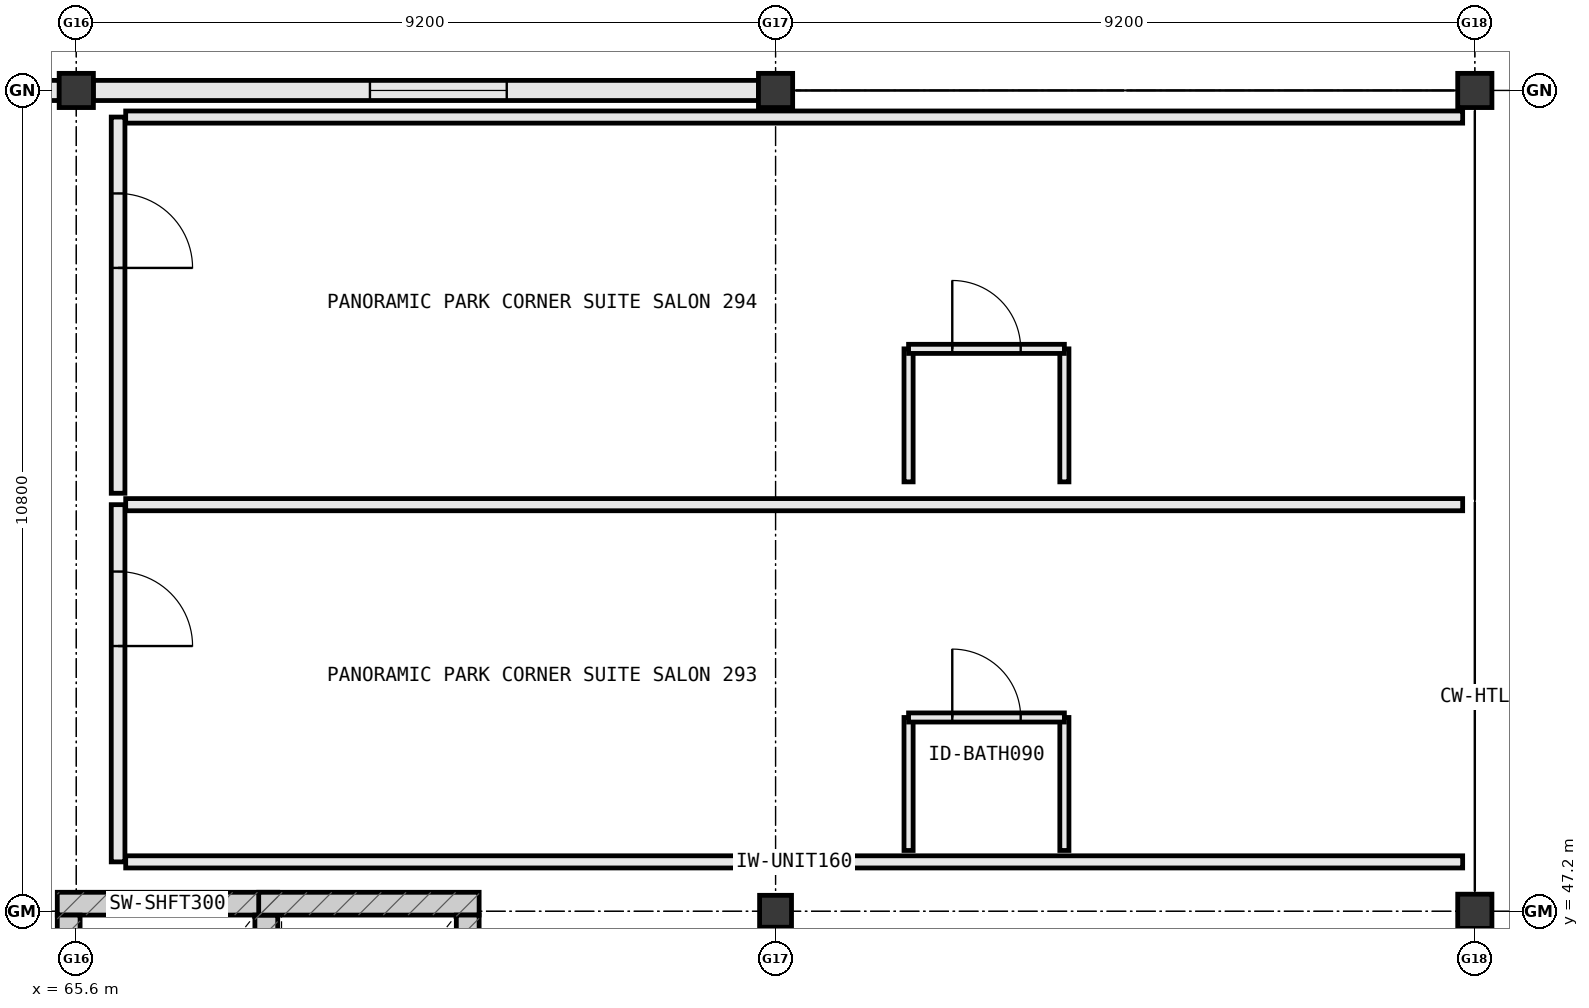
"""IFC4 building model, lengths in metres.
Left out: names, types, materials, properties, quantities, classifications, styles, units other than length and angle.
Written with IfcOpenShell. Run it as: python <this file> out.ifc"""

import sys

from ifc_helpers import new_model, si_unit, direction, frame, frame_2d, origin, origin_2d, place, context, subcontext, project, spatial, rectangle, extrude, element, fill, save


model = new_model("IFC4")
c1 = context("Model", 3, precision=1e-05, world=origin(), true_north=direction((0.0, 1.0)))
c2 = subcontext(c1, "Body", "Model", "MODEL_VIEW")
j1 = project(units=[si_unit("LENGTHUNIT", "METRE"), si_unit("PLANEANGLEUNIT", "RADIAN")], contexts=[c1])
p1 = place(None, origin())
s1 = spatial("IfcSite", under=j1, at=p1, CompositionType="ELEMENT")
p2 = place(p1, origin())
s2 = spatial("IfcBuilding", under=s1, at=p2, CompositionType="ELEMENT")
p3 = place(p2, frame((0.0, 0.0, 42.8)))
s3 = spatial("IfcBuildingStorey", under=s2, at=p3, CompositionType="ELEMENT", Elevation=42.8)
p4 = place(p3, frame((74.8, 47.2, 0.0), z_axis=(0.0, 0.0, 1.0), x_axis=(1.0, 0.0, 0.0)))
e1 = element("IfcColumn", 1, at=p4, inside=s3, PredefinedType="COLUMN", context=c2, shape_type="SweptSolid", body=[
    extrude(rectangle(XDim=0.42, YDim=0.42, at=origin_2d()), origin(), (0.0, 0.0, 1.0), 3.8),
])
for number, where, z_axis, x_axis in (
    (2, (74.8, 58.0, 0.0), (0.0, 0.0, 1.0), (1.0, 0.0, 0.0)),
    (3, (84.0, 47.2, 0.0), (0.0, 0.0, 1.0), (1.0, 0.0, 0.0)),
    (4, (84.0, 58.0, 0.0), (0.0, 0.0, 1.0), (1.0, 0.0, 0.0)),
    (5, (65.6, 58.0, 0.0), (0.0, 0.0, 1.0), (1.0, 0.0, 0.0)),
):
    element("IfcColumn", number, at=place(p3, frame(where, z_axis=z_axis, x_axis=x_axis)), inside=s3, PredefinedType="COLUMN", context=c2, shape_type="SweptSolid", body=[
        extrude(rectangle(XDim=0.45, YDim=0.45, at=origin_2d()), origin(), (0.0, 0.0, 1.0), 3.8),
    ])
p5 = place(p3, frame((74.577, 58.0, 0.0), z_axis=(0.0, 0.0, 1.0), x_axis=(-1.0, 0.0, 0.0)))
e6 = element("IfcWall", 6, at=p5, inside=s3, PredefinedType="STANDARD", context=c2, shape_type="SweptSolid", body=[
    extrude(rectangle(XDim=8.754, YDim=0.265, at=frame_2d((4.377, 0.0))), origin(), (0.0, 0.0, 1.0), 2.855),
])
p6 = place(p5, frame((3.313, 0.0, 0.85)))
e7 = element("IfcOpeningElement", 7, at=p6, cuts=e6, PredefinedType="OPENING", context=c2, shape_type="SweptSolid", body=[
    extrude(rectangle(XDim=1.8, YDim=1.85, at=frame_2d((0.9, 0.925))), frame((0.0, 0.145, 0.0), z_axis=(0.0, -1.0, 0.0), x_axis=(1.0, 0.0, 0.0)), (0.0, 0.0, 1.0), 0.289),
])
p7 = place(p3, frame((65.377, 58.0, 0.0), z_axis=(0.0, 0.0, 1.0), x_axis=(-1.0, 0.0, 0.0)))
e8 = element("IfcWall", 8, at=p7, inside=s3, PredefinedType="STANDARD", context=c2, shape_type="SweptSolid", body=[
    extrude(rectangle(XDim=4.354, YDim=0.265, at=frame_2d((2.177, 0.0))), origin(), (0.0, 0.0, 1.0), 2.855),
])
p8 = place(p7, frame((2.5, 0.0, 0.85)))
e9 = element("IfcOpeningElement", 9, at=p8, cuts=e8, PredefinedType="OPENING", context=c2, shape_type="SweptSolid", body=[
    extrude(rectangle(XDim=1.65, YDim=1.8, at=frame_2d((0.825, 0.9))), frame((0.0, 0.145, 0.0), z_axis=(0.0, -1.0, 0.0), x_axis=(1.0, 0.0, 0.0)), (0.0, 0.0, 1.0), 0.289),
])
for number, where, z_axis, x_axis in (
    (10, (68.25, 47.3, 0.0), (0.0, 0.0, 1.0), (-1.0, 0.0, 0.0)),
    (11, (68.1, 44.25, 0.0), (0.0, 0.0, 1.0), (0.0, 1.0, 0.0)),
    (12, (65.5, 47.15, 0.0), (0.0, 0.0, 1.0), (0.0, -1.0, 0.0)),
    (13, (70.9, 47.3, 0.0), (0.0, 0.0, 1.0), (-1.0, 0.0, 0.0)),
    (14, (70.75, 44.25, 0.0), (0.0, 0.0, 1.0), (0.0, 1.0, 0.0)),
):
    element("IfcWall", number, at=place(p3, frame(where, z_axis=z_axis, x_axis=x_axis)), inside=s3, PredefinedType="SHEAR", context=c2, shape_type="SweptSolid", body=[
        extrude(rectangle(XDim=2.9, YDim=0.3, at=frame_2d((1.45, 0.0))), origin(), (0.0, 0.0, 1.0), 3.8),
    ])
p9 = place(p3, frame((66.15, 52.55, 0.0), z_axis=(0.0, 0.0, 1.0), x_axis=(0.0, -1.0, 0.0)))
e15 = element("IfcWall", 15, at=p9, inside=s3, PredefinedType="PARTITIONING", context=c2, shape_type="SweptSolid", body=[
    extrude(rectangle(XDim=4.7, YDim=0.18, at=frame_2d((2.35, 0.0))), origin(), (0.0, 0.0, 1.0), 3.54),
])
p10 = place(p9, frame((0.88, 0.0, 0.0)))
e16 = element("IfcOpeningElement", 16, at=p10, cuts=e15, PredefinedType="OPENING", context=c2, shape_type="SweptSolid", body=[
    extrude(rectangle(XDim=0.98, YDim=2.18, at=frame_2d((0.49, 1.09))), frame((0.0, 0.102, 0.0), z_axis=(0.0, -1.0, 0.0), x_axis=(1.0, 0.0, 0.0)), (0.0, 0.0, 1.0), 0.204),
])
for number, where, z_axis, x_axis in (
    (17, (66.25, 47.85, 0.0), (0.0, 0.0, 1.0), (1.0, 0.0, 0.0)),
    (18, (66.25, 52.55, 0.0), (0.0, 0.0, 1.0), (1.0, 0.0, 0.0)),
):
    element("IfcWall", number, at=place(p3, frame(where, z_axis=z_axis, x_axis=x_axis)), inside=s3, PredefinedType="PARTITIONING", context=c2, shape_type="SweptSolid", body=[
        extrude(rectangle(XDim=17.59, YDim=0.16, at=frame_2d((8.795, 0.0))), origin(), (0.0, 0.0, 1.0), 3.54),
    ])
for number, where, z_axis, x_axis in (
    (19, (76.55, 48.0, 0.0), (0.0, 0.0, 1.0), (0.0, 1.0, 0.0)),
    (20, (78.6, 48.0, 0.0), (0.0, 0.0, 1.0), (0.0, 1.0, 0.0)),
):
    element("IfcWall", number, at=place(p3, frame(where, z_axis=z_axis, x_axis=x_axis)), inside=s3, PredefinedType="PARTITIONING", context=c2, shape_type="SweptSolid", body=[
        extrude(rectangle(XDim=1.75, YDim=0.12, at=frame_2d((0.875, 0.0))), origin(), (0.0, 0.0, 1.0), 3.54),
    ])
p11 = place(p3, frame((76.55, 49.75, 0.0), z_axis=(0.0, 0.0, 1.0), x_axis=(1.0, 0.0, 0.0)))
e21 = element("IfcWall", 21, at=p11, inside=s3, PredefinedType="PARTITIONING", context=c2, shape_type="SweptSolid", body=[
    extrude(rectangle(XDim=2.05, YDim=0.12, at=frame_2d((1.025, 0.0))), origin(), (0.0, 0.0, 1.0), 3.54),
])
p12 = place(p11, frame((0.575, 0.0, 0.0)))
e22 = element("IfcOpeningElement", 22, at=p12, cuts=e21, PredefinedType="OPENING", context=c2, shape_type="SweptSolid", body=[
    extrude(rectangle(XDim=0.9, YDim=2.15, at=frame_2d((0.45, 1.075))), frame((0.0, 0.072, 0.0), z_axis=(0.0, -1.0, 0.0), x_axis=(1.0, 0.0, 0.0)), (0.0, 0.0, 1.0), 0.144),
])
p13 = place(p3, frame((66.15, 57.65, 0.0), z_axis=(0.0, 0.0, 1.0), x_axis=(0.0, -1.0, 0.0)))
e23 = element("IfcWall", 23, at=p13, inside=s3, PredefinedType="PARTITIONING", context=c2, shape_type="SweptSolid", body=[
    extrude(rectangle(XDim=4.95, YDim=0.18, at=frame_2d((2.475, 0.0))), origin(), (0.0, 0.0, 1.0), 3.54),
])
p14 = place(p13, frame((1.005, 0.0, 0.0)))
e24 = element("IfcOpeningElement", 24, at=p14, cuts=e23, PredefinedType="OPENING", context=c2, shape_type="SweptSolid", body=[
    extrude(rectangle(XDim=0.98, YDim=2.18, at=frame_2d((0.49, 1.09))), frame((0.0, 0.102, 0.0), z_axis=(0.0, -1.0, 0.0), x_axis=(1.0, 0.0, 0.0)), (0.0, 0.0, 1.0), 0.204),
])
p15 = place(p3, frame((66.25, 57.65, 0.0), z_axis=(0.0, 0.0, 1.0), x_axis=(1.0, 0.0, 0.0)))
e25 = element("IfcWall", 25, at=p15, inside=s3, PredefinedType="PARTITIONING", context=c2, shape_type="SweptSolid", body=[
    extrude(rectangle(XDim=17.59, YDim=0.16, at=frame_2d((8.795, 0.0))), origin(), (0.0, 0.0, 1.0), 2.855),
])
for number, where, z_axis, x_axis in (
    (26, (76.55, 52.85, 0.0), (0.0, 0.0, 1.0), (0.0, 1.0, 0.0)),
    (27, (78.6, 52.85, 0.0), (0.0, 0.0, 1.0), (0.0, 1.0, 0.0)),
):
    element("IfcWall", number, at=place(p3, frame(where, z_axis=z_axis, x_axis=x_axis)), inside=s3, PredefinedType="PARTITIONING", context=c2, shape_type="SweptSolid", body=[
        extrude(rectangle(XDim=1.75, YDim=0.12, at=frame_2d((0.875, 0.0))), origin(), (0.0, 0.0, 1.0), 3.54),
    ])
p16 = place(p3, frame((76.55, 54.6, 0.0), z_axis=(0.0, 0.0, 1.0), x_axis=(1.0, 0.0, 0.0)))
e28 = element("IfcWall", 28, at=p16, inside=s3, PredefinedType="PARTITIONING", context=c2, shape_type="SweptSolid", body=[
    extrude(rectangle(XDim=2.05, YDim=0.12, at=frame_2d((1.025, 0.0))), origin(), (0.0, 0.0, 1.0), 3.54),
])
p17 = place(p16, frame((0.575, 0.0, 0.0)))
e29 = element("IfcOpeningElement", 29, at=p17, cuts=e28, PredefinedType="OPENING", context=c2, shape_type="SweptSolid", body=[
    extrude(rectangle(XDim=0.9, YDim=2.15, at=frame_2d((0.45, 1.075))), frame((0.0, 0.072, 0.0), z_axis=(0.0, -1.0, 0.0), x_axis=(1.0, 0.0, 0.0)), (0.0, 0.0, 1.0), 0.144),
])
p18 = place(p6, origin())
e30 = element("IfcWindow", 30, at=p18, inside=s3, PartitioningType="SINGLE_PANEL", PredefinedType="WINDOW", context=c2, shape_type="SweptSolid", body=[
    extrude(rectangle(XDim=1.8, YDim=1.85, at=frame_2d((0.9, 0.925))), frame((0.0, 0.03, 0.0), z_axis=(0.0, -1.0, 0.0), x_axis=(1.0, 0.0, 0.0)), (0.0, 0.0, 1.0), 0.06),
])
fill(e7, e30)
p19 = place(p10, origin())
e31 = element("IfcDoor", 31, at=p19, inside=s3, OperationType="SINGLE_SWING_RIGHT", PredefinedType="DOOR", context=c2, shape_type="SweptSolid", body=[
    extrude(rectangle(XDim=0.98, YDim=2.18, at=frame_2d((0.49, 1.09))), frame((0.0, 0.025, 0.0), z_axis=(0.0, -1.0, 0.0), x_axis=(1.0, 0.0, 0.0)), (0.0, 0.0, 1.0), 0.05),
])
fill(e16, e31)
p20 = place(p12, origin())
e32 = element("IfcDoor", 32, at=p20, inside=s3, OperationType="SINGLE_SWING_LEFT", PredefinedType="DOOR", context=c2, shape_type="SweptSolid", body=[
    extrude(rectangle(XDim=0.9, YDim=2.15, at=frame_2d((0.45, 1.075))), frame((0.0, 0.025, 0.0), z_axis=(0.0, -1.0, 0.0), x_axis=(1.0, 0.0, 0.0)), (0.0, 0.0, 1.0), 0.05),
])
fill(e22, e32)
p21 = place(p14, origin())
e33 = element("IfcDoor", 33, at=p21, inside=s3, OperationType="SINGLE_SWING_RIGHT", PredefinedType="DOOR", context=c2, shape_type="SweptSolid", body=[
    extrude(rectangle(XDim=0.98, YDim=2.18, at=frame_2d((0.49, 1.09))), frame((0.0, 0.025, 0.0), z_axis=(0.0, -1.0, 0.0), x_axis=(1.0, 0.0, 0.0)), (0.0, 0.0, 1.0), 0.05),
])
fill(e24, e33)
p22 = place(p17, origin())
e34 = element("IfcDoor", 34, at=p22, inside=s3, OperationType="SINGLE_SWING_LEFT", PredefinedType="DOOR", context=c2, shape_type="SweptSolid", body=[
    extrude(rectangle(XDim=0.9, YDim=2.15, at=frame_2d((0.45, 1.075))), frame((0.0, 0.025, 0.0), z_axis=(0.0, -1.0, 0.0), x_axis=(1.0, 0.0, 0.0)), (0.0, 0.0, 1.0), 0.05),
])
fill(e29, e34)
save(model, sys.argv[1])
